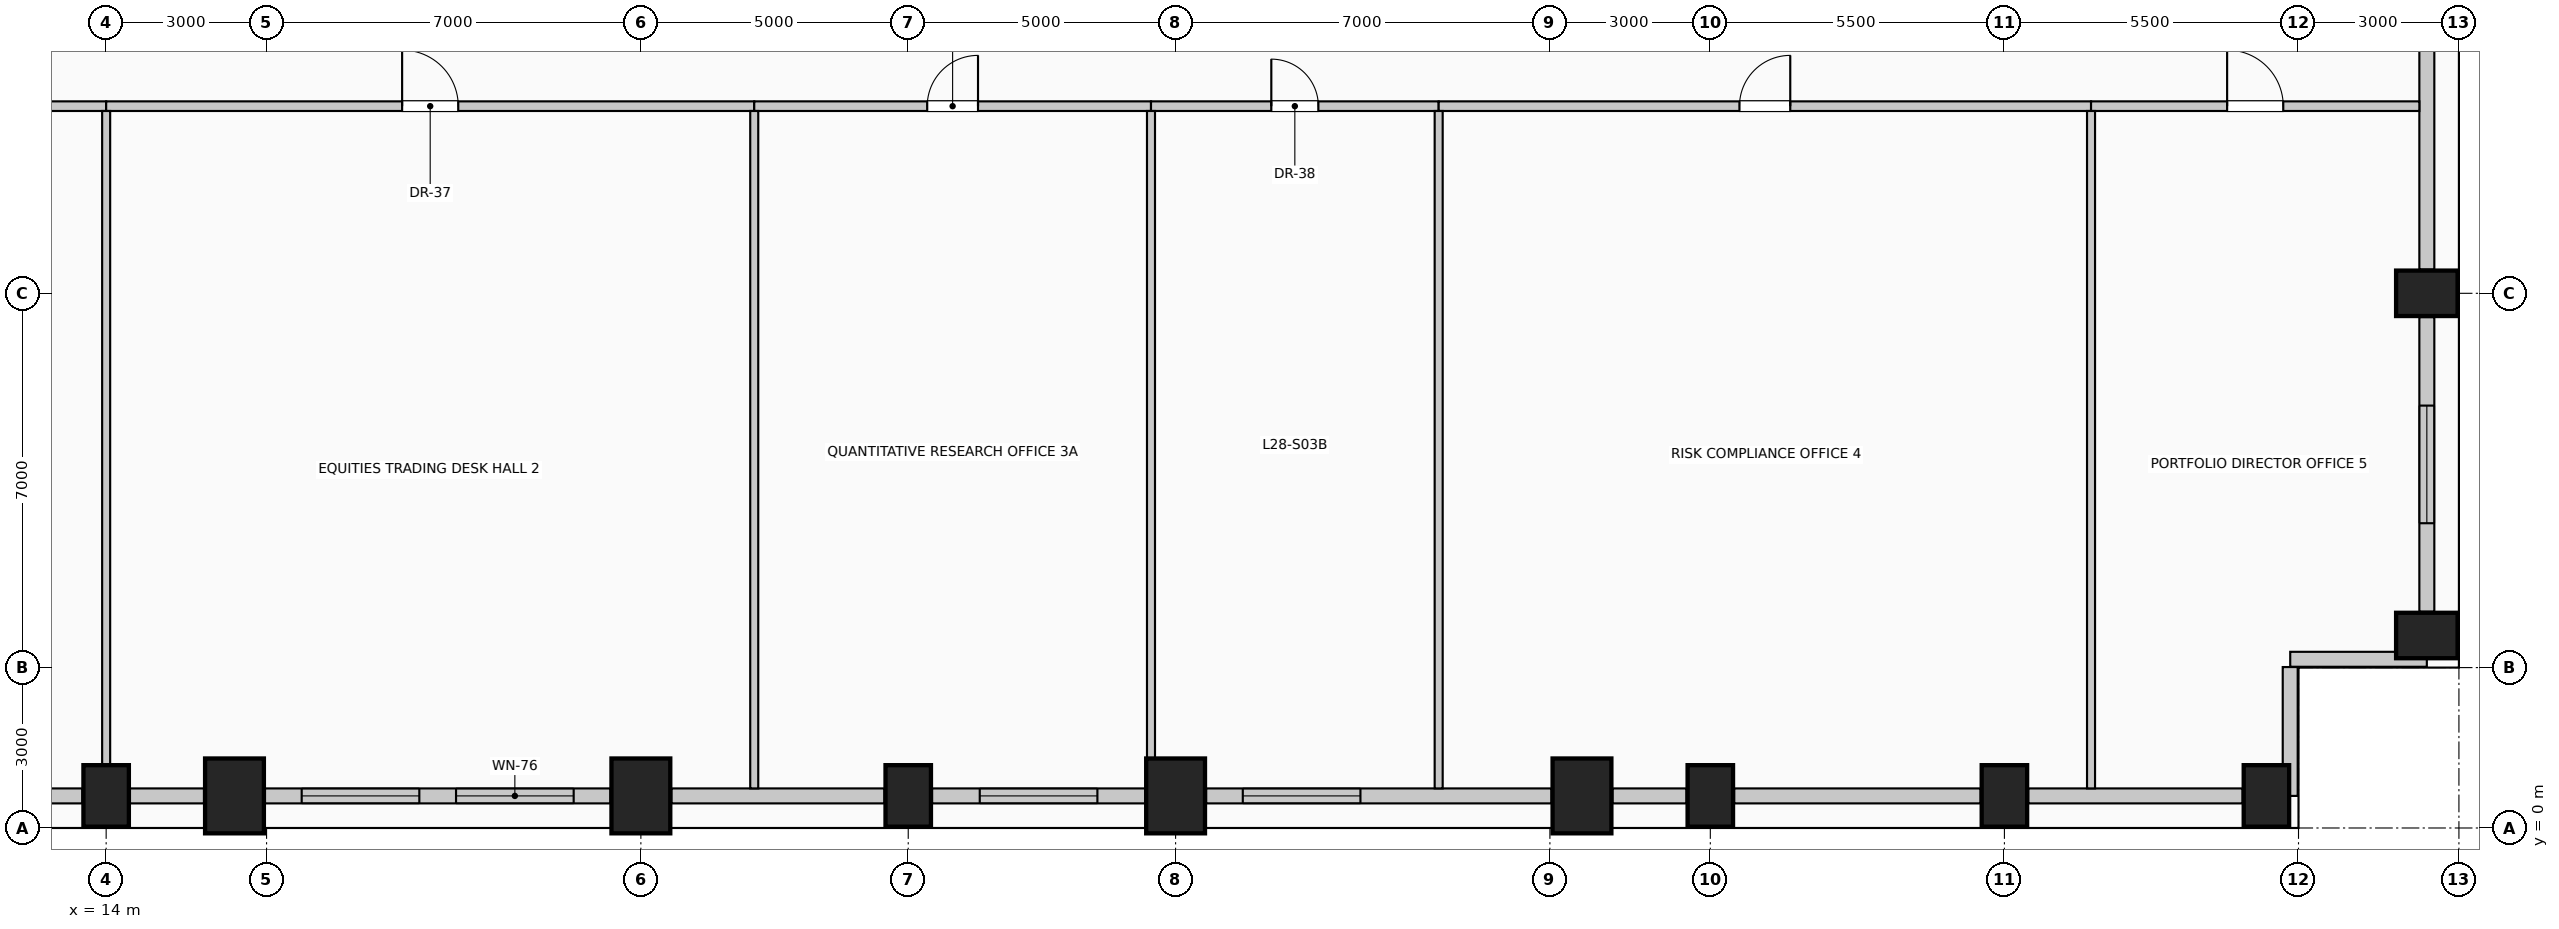
"""IFC4 building model, lengths in metres.
Left out: names, types, materials, properties, quantities, classifications, styles, units other than length and angle.
Written with IfcOpenShell. Run it as: python <this file> out.ifc"""

import sys

from ifc_helpers import new_model, si_unit, direction, frame, frame_2d, origin, origin_2d, place, context, subcontext, project, spatial, rectangle, extrude, element, fill, save


model = new_model("IFC4")
c1 = context("Model", 3, precision=1e-05, world=origin(), true_north=direction((0.0, 1.0)))
c2 = subcontext(c1, "Body", "Model", "MODEL_VIEW")
j1 = project(units=[si_unit("LENGTHUNIT", "METRE"), si_unit("PLANEANGLEUNIT", "RADIAN")], contexts=[c1])
p1 = place(None, origin())
s1 = spatial("IfcSite", under=j1, at=p1, CompositionType="ELEMENT")
p2 = place(p1, origin())
s2 = spatial("IfcBuilding", under=s1, at=p2, CompositionType="ELEMENT")
p3 = place(p2, frame((0.0, 0.0, 116.6)))
s3 = spatial("IfcBuildingStorey", under=s2, at=p3, CompositionType="ELEMENT", Elevation=116.6)
p4 = place(p3, frame((14.0, 0.6, 0.0), z_axis=(0.0, 0.0, 1.0), x_axis=(1.0, 0.0, 0.0)))
e1 = element("IfcColumn", 1, at=p4, inside=s3, PredefinedType="COLUMN", context=c2, shape_type="SweptSolid", body=[
    extrude(rectangle(XDim=0.85, YDim=1.15, at=origin_2d()), origin(), (0.0, 0.0, 1.0), 4.0),
])
for number, where, z_axis, x_axis in (
    (2, (16.4, 0.6, 0.0), (0.0, 0.0, 1.0), (1.0, 0.0, 0.0)),
    (3, (24.0, 0.6, 0.0), (0.0, 0.0, 1.0), (1.0, 0.0, 0.0)),
):
    element("IfcColumn", number, at=place(p3, frame(where, z_axis=z_axis, x_axis=x_axis)), inside=s3, PredefinedType="COLUMN", context=c2, shape_type="SweptSolid", body=[
        extrude(rectangle(XDim=1.1, YDim=1.4, at=origin_2d()), origin(), (0.0, 0.0, 1.0), 4.0),
    ])
p5 = place(p3, frame((29.0, 0.6, 0.0), z_axis=(0.0, 0.0, 1.0), x_axis=(1.0, 0.0, 0.0)))
e4 = element("IfcColumn", 4, at=p5, inside=s3, PredefinedType="COLUMN", context=c2, shape_type="SweptSolid", body=[
    extrude(rectangle(XDim=0.85, YDim=1.15, at=origin_2d()), origin(), (0.0, 0.0, 1.0), 4.0),
])
for number, where, z_axis, x_axis in (
    (5, (34.0, 0.6, 0.0), (0.0, 0.0, 1.0), (1.0, 0.0, 0.0)),
    (6, (41.6, 0.6, 0.0), (0.0, 0.0, 1.0), (1.0, 0.0, 0.0)),
):
    element("IfcColumn", number, at=place(p3, frame(where, z_axis=z_axis, x_axis=x_axis)), inside=s3, PredefinedType="COLUMN", context=c2, shape_type="SweptSolid", body=[
        extrude(rectangle(XDim=1.1, YDim=1.4, at=origin_2d()), origin(), (0.0, 0.0, 1.0), 4.0),
    ])
for number, where, z_axis, x_axis in (
    (7, (44.0, 0.6, 0.0), (0.0, 0.0, 1.0), (1.0, 0.0, 0.0)),
    (8, (49.5, 0.6, 0.0), (0.0, 0.0, 1.0), (1.0, 0.0, 0.0)),
    (9, (54.4, 0.6, 0.0), (0.0, 0.0, 1.0), (1.0, 0.0, 0.0)),
    (10, (57.4, 3.6, 0.0), (0.0, 0.0, 1.0), (0.0, 1.0, 0.0)),
    (11, (57.4, 10.0, 0.0), (0.0, 0.0, 1.0), (0.0, 1.0, 0.0)),
):
    element("IfcColumn", number, at=place(p3, frame(where, z_axis=z_axis, x_axis=x_axis)), inside=s3, PredefinedType="COLUMN", context=c2, shape_type="SweptSolid", body=[
        extrude(rectangle(XDim=0.85, YDim=1.15, at=origin_2d()), origin(), (0.0, 0.0, 1.0), 4.0),
    ])
p6 = place(p3, frame((13.555, 0.6, 0.0), z_axis=(0.0, 0.0, 1.0), x_axis=(-1.0, 0.0, 0.0)))
e12 = element("IfcWall", 12, at=p6, inside=s3, PredefinedType="SOLIDWALL", context=c2, shape_type="SweptSolid", body=[
    extrude(rectangle(XDim=4.61, YDim=0.28, at=frame_2d((2.305, 0.0))), origin(), (0.0, 0.0, 1.0), 2.875),
])
p7 = place(p3, frame((15.83, 0.6, 0.0), z_axis=(0.0, 0.0, 1.0), x_axis=(-1.0, 0.0, 0.0)))
e13 = element("IfcWall", 13, at=p7, inside=s3, PredefinedType="SOLIDWALL", context=c2, shape_type="SweptSolid", body=[
    extrude(rectangle(XDim=1.385, YDim=0.28, at=frame_2d((0.692, 0.0))), origin(), (0.0, 0.0, 1.0), 2.875),
])
p8 = place(p3, frame((23.43, 0.6, 0.0), z_axis=(0.0, 0.0, 1.0), x_axis=(-1.0, 0.0, 0.0)))
e14 = element("IfcWall", 14, at=p8, inside=s3, PredefinedType="SOLIDWALL", context=c2, shape_type="SweptSolid", body=[
    extrude(rectangle(XDim=6.46, YDim=0.28, at=frame_2d((3.23, 0.0))), origin(), (0.0, 0.0, 1.0), 2.875),
])
p9 = place(p8, frame((0.687, 0.0, 0.5)))
e15 = element("IfcOpeningElement", 15, at=p9, cuts=e14, PredefinedType="OPENING", context=c2, shape_type="SweptSolid", body=[
    extrude(rectangle(XDim=2.2, YDim=1.95, at=frame_2d((1.1, 0.975))), frame((0.0, 0.15, 0.0), z_axis=(0.0, -1.0, 0.0), x_axis=(1.0, 0.0, 0.0)), (0.0, 0.0, 1.0), 0.3),
])
p10 = place(p8, frame((3.573, 0.0, 0.5)))
e16 = element("IfcOpeningElement", 16, at=p10, cuts=e14, PredefinedType="OPENING", context=c2, shape_type="SweptSolid", body=[
    extrude(rectangle(XDim=2.2, YDim=1.95, at=frame_2d((1.1, 0.975))), frame((0.0, 0.15, 0.0), z_axis=(0.0, -1.0, 0.0), x_axis=(1.0, 0.0, 0.0)), (0.0, 0.0, 1.0), 0.3),
])
p11 = place(p3, frame((28.555, 0.6, 0.0), z_axis=(0.0, 0.0, 1.0), x_axis=(-1.0, 0.0, 0.0)))
e17 = element("IfcWall", 17, at=p11, inside=s3, PredefinedType="SOLIDWALL", context=c2, shape_type="SweptSolid", body=[
    extrude(rectangle(XDim=3.985, YDim=0.28, at=frame_2d((1.992, 0.0))), origin(), (0.0, 0.0, 1.0), 2.875),
])
p12 = place(p3, frame((33.43, 0.6, 0.0), z_axis=(0.0, 0.0, 1.0), x_axis=(-1.0, 0.0, 0.0)))
e18 = element("IfcWall", 18, at=p12, inside=s3, PredefinedType="SOLIDWALL", context=c2, shape_type="SweptSolid", body=[
    extrude(rectangle(XDim=3.985, YDim=0.28, at=frame_2d((1.992, 0.0))), origin(), (0.0, 0.0, 1.0), 2.875),
])
p13 = place(p12, frame((0.893, 0.0, 0.5)))
e19 = element("IfcOpeningElement", 19, at=p13, cuts=e18, PredefinedType="OPENING", context=c2, shape_type="SweptSolid", body=[
    extrude(rectangle(XDim=2.2, YDim=1.95, at=frame_2d((1.1, 0.975))), frame((0.0, 0.15, 0.0), z_axis=(0.0, -1.0, 0.0), x_axis=(1.0, 0.0, 0.0)), (0.0, 0.0, 1.0), 0.3),
])
p14 = place(p3, frame((41.03, 0.6, 0.0), z_axis=(0.0, 0.0, 1.0), x_axis=(-1.0, 0.0, 0.0)))
e20 = element("IfcWall", 20, at=p14, inside=s3, PredefinedType="SOLIDWALL", context=c2, shape_type="SweptSolid", body=[
    extrude(rectangle(XDim=6.46, YDim=0.28, at=frame_2d((3.23, 0.0))), origin(), (0.0, 0.0, 1.0), 2.875),
])
p15 = place(p14, frame((3.573, 0.0, 0.5)))
e21 = element("IfcOpeningElement", 21, at=p15, cuts=e20, PredefinedType="OPENING", context=c2, shape_type="SweptSolid", body=[
    extrude(rectangle(XDim=2.2, YDim=1.95, at=frame_2d((1.1, 0.975))), frame((0.0, 0.15, 0.0), z_axis=(0.0, -1.0, 0.0), x_axis=(1.0, 0.0, 0.0)), (0.0, 0.0, 1.0), 0.3),
])
p16 = place(p3, frame((43.555, 0.6, 0.0), z_axis=(0.0, 0.0, 1.0), x_axis=(-1.0, 0.0, 0.0)))
e22 = element("IfcWall", 22, at=p16, inside=s3, PredefinedType="SOLIDWALL", context=c2, shape_type="SweptSolid", body=[
    extrude(rectangle(XDim=1.385, YDim=0.28, at=frame_2d((0.692, 0.0))), origin(), (0.0, 0.0, 1.0), 2.875),
])
p17 = place(p3, frame((49.055, 0.6, 0.0), z_axis=(0.0, 0.0, 1.0), x_axis=(-1.0, 0.0, 0.0)))
e23 = element("IfcWall", 23, at=p17, inside=s3, PredefinedType="SOLIDWALL", context=c2, shape_type="SweptSolid", body=[
    extrude(rectangle(XDim=4.61, YDim=0.28, at=frame_2d((2.305, 0.0))), origin(), (0.0, 0.0, 1.0), 2.875),
])
p18 = place(p3, frame((53.955, 0.6, 0.0), z_axis=(0.0, 0.0, 1.0), x_axis=(-1.0, 0.0, 0.0)))
e24 = element("IfcWall", 24, at=p18, inside=s3, PredefinedType="SOLIDWALL", context=c2, shape_type="SweptSolid", body=[
    extrude(rectangle(XDim=4.01, YDim=0.28, at=frame_2d((2.005, 0.0))), origin(), (0.0, 0.0, 1.0), 2.875),
])
p19 = place(p3, frame((57.4, 9.555, 0.0), z_axis=(0.0, 0.0, 1.0), x_axis=(0.0, -1.0, 0.0)))
e25 = element("IfcWall", 25, at=p19, inside=s3, PredefinedType="SOLIDWALL", context=c2, shape_type="SweptSolid", body=[
    extrude(rectangle(XDim=5.51, YDim=0.28, at=frame_2d((2.755, 0.0))), origin(), (0.0, 0.0, 1.0), 2.875),
])
p20 = place(p19, frame((1.655, 0.0, 0.5)))
e26 = element("IfcOpeningElement", 26, at=p20, cuts=e25, PredefinedType="OPENING", context=c2, shape_type="SweptSolid", body=[
    extrude(rectangle(XDim=2.2, YDim=1.95, at=frame_2d((1.1, 0.975))), frame((0.0, 0.15, 0.0), z_axis=(0.0, -1.0, 0.0), x_axis=(1.0, 0.0, 0.0)), (0.0, 0.0, 1.0), 0.3),
])
p21 = place(p3, frame((57.4, 17.555, 0.0), z_axis=(0.0, 0.0, 1.0), x_axis=(0.0, -1.0, 0.0)))
e27 = element("IfcWall", 27, at=p21, inside=s3, PredefinedType="SOLIDWALL", context=c2, shape_type="SweptSolid", body=[
    extrude(rectangle(XDim=7.11, YDim=0.28, at=frame_2d((3.555, 0.0))), origin(), (0.0, 0.0, 1.0), 2.875),
])
p22 = place(p3, frame((57.4, 3.155, 0.0), z_axis=(0.0, 0.0, 1.0), x_axis=(-1.0, 0.0, 0.0)))
e28 = element("IfcWall", 28, at=p22, inside=s3, PredefinedType="SOLIDWALL", context=c2, shape_type="SweptSolid", body=[
    extrude(rectangle(XDim=2.555, YDim=0.28, at=frame_2d((1.277, 0.0))), origin(), (0.0, 0.0, 1.0), 3.725),
])
p23 = place(p3, frame((54.845, 3.01, 0.0), z_axis=(0.0, 0.0, 1.0), x_axis=(0.0, -1.0, 0.0)))
e29 = element("IfcWall", 29, at=p23, inside=s3, PredefinedType="SOLIDWALL", context=c2, shape_type="SweptSolid", body=[
    extrude(rectangle(XDim=2.41, YDim=0.28, at=frame_2d((1.205, 0.0))), origin(), (0.0, 0.0, 1.0), 3.725),
])
p24 = place(p3, frame((0.74, 13.5, 0.0), z_axis=(0.0, 0.0, 1.0), x_axis=(1.0, 0.0, 0.0)))
e30 = element("IfcWall", 30, at=p24, inside=s3, PredefinedType="PARTITIONING", context=c2, shape_type="SweptSolid", body=[
    extrude(rectangle(XDim=13.26, YDim=0.18, at=frame_2d((6.63, 0.0))), origin(), (0.0, 0.0, 1.0), 3.725),
])
p25 = place(p24, frame((6.155, 0.0, 0.0)))
e31 = element("IfcOpeningElement", 31, at=p25, cuts=e30, PredefinedType="OPENING", context=c2, shape_type="SweptSolid", body=[
    extrude(rectangle(XDim=0.95, YDim=2.15, at=frame_2d((0.475, 1.075))), frame((0.0, 0.1, 0.0), z_axis=(0.0, -1.0, 0.0), x_axis=(1.0, 0.0, 0.0)), (0.0, 0.0, 1.0), 0.2),
])
p26 = place(p3, frame((14.0, 13.5, 0.0), z_axis=(0.0, 0.0, 1.0), x_axis=(1.0, 0.0, 0.0)))
e32 = element("IfcWall", 32, at=p26, inside=s3, PredefinedType="PARTITIONING", context=c2, shape_type="SweptSolid", body=[
    extrude(rectangle(XDim=12.12, YDim=0.18, at=frame_2d((6.06, 0.0))), origin(), (0.0, 0.0, 1.0), 3.725),
])
p27 = place(p26, frame((5.535, 0.0, 0.0)))
e33 = element("IfcOpeningElement", 33, at=p27, cuts=e32, PredefinedType="OPENING", context=c2, shape_type="SweptSolid", body=[
    extrude(rectangle(XDim=1.05, YDim=2.15, at=frame_2d((0.525, 1.075))), frame((0.0, 0.1, 0.0), z_axis=(0.0, -1.0, 0.0), x_axis=(1.0, 0.0, 0.0)), (0.0, 0.0, 1.0), 0.2),
])
p28 = place(p3, frame((26.12, 13.5, 0.0), z_axis=(0.0, 0.0, 1.0), x_axis=(1.0, 0.0, 0.0)))
e34 = element("IfcWall", 34, at=p28, inside=s3, PredefinedType="PARTITIONING", context=c2, shape_type="SweptSolid", body=[
    extrude(rectangle(XDim=7.42, YDim=0.18, at=frame_2d((3.71, 0.0))), origin(), (0.0, 0.0, 1.0), 3.725),
])
p29 = place(p28, frame((3.235, 0.0, 0.0)))
e35 = element("IfcOpeningElement", 35, at=p29, cuts=e34, PredefinedType="OPENING", context=c2, shape_type="SweptSolid", body=[
    extrude(rectangle(XDim=0.95, YDim=2.15, at=frame_2d((0.475, 1.075))), frame((0.0, 0.1, 0.0), z_axis=(0.0, -1.0, 0.0), x_axis=(1.0, 0.0, 0.0)), (0.0, 0.0, 1.0), 0.2),
])
p30 = place(p3, frame((33.54, 13.5, 0.0), z_axis=(0.0, 0.0, 1.0), x_axis=(1.0, 0.0, 0.0)))
e36 = element("IfcWall", 36, at=p30, inside=s3, PredefinedType="PARTITIONING", context=c2, shape_type="SweptSolid", body=[
    extrude(rectangle(XDim=5.38, YDim=0.18, at=frame_2d((2.69, 0.0))), origin(), (0.0, 0.0, 1.0), 3.725),
])
p31 = place(p30, frame((2.25, 0.0, 0.0)))
e37 = element("IfcOpeningElement", 37, at=p31, cuts=e36, PredefinedType="OPENING", context=c2, shape_type="SweptSolid", body=[
    extrude(rectangle(XDim=0.88, YDim=2.1, at=frame_2d((0.44, 1.05))), frame((0.0, 0.1, 0.0), z_axis=(0.0, -1.0, 0.0), x_axis=(1.0, 0.0, 0.0)), (0.0, 0.0, 1.0), 0.2),
])
p32 = place(p3, frame((38.92, 13.5, 0.0), z_axis=(0.0, 0.0, 1.0), x_axis=(1.0, 0.0, 0.0)))
e38 = element("IfcWall", 38, at=p32, inside=s3, PredefinedType="PARTITIONING", context=c2, shape_type="SweptSolid", body=[
    extrude(rectangle(XDim=12.2, YDim=0.18, at=frame_2d((6.1, 0.0))), origin(), (0.0, 0.0, 1.0), 3.725),
])
p33 = place(p32, frame((5.625, 0.0, 0.0)))
e39 = element("IfcOpeningElement", 39, at=p33, cuts=e38, PredefinedType="OPENING", context=c2, shape_type="SweptSolid", body=[
    extrude(rectangle(XDim=0.95, YDim=2.15, at=frame_2d((0.475, 1.075))), frame((0.0, 0.1, 0.0), z_axis=(0.0, -1.0, 0.0), x_axis=(1.0, 0.0, 0.0)), (0.0, 0.0, 1.0), 0.2),
])
p34 = place(p3, frame((51.12, 13.5, 0.0), z_axis=(0.0, 0.0, 1.0), x_axis=(1.0, 0.0, 0.0)))
e40 = element("IfcWall", 40, at=p34, inside=s3, PredefinedType="PARTITIONING", context=c2, shape_type="SweptSolid", body=[
    extrude(rectangle(XDim=6.14, YDim=0.18, at=frame_2d((3.07, 0.0))), origin(), (0.0, 0.0, 1.0), 3.725),
])
p35 = place(p34, frame((2.545, 0.0, 0.0)))
e41 = element("IfcOpeningElement", 41, at=p35, cuts=e40, PredefinedType="OPENING", context=c2, shape_type="SweptSolid", body=[
    extrude(rectangle(XDim=1.05, YDim=2.15, at=frame_2d((0.525, 1.075))), frame((0.0, 0.1, 0.0), z_axis=(0.0, -1.0, 0.0), x_axis=(1.0, 0.0, 0.0)), (0.0, 0.0, 1.0), 0.2),
])
p36 = place(p3, frame((14.0, 1.175, 0.0), z_axis=(0.0, 0.0, 1.0), x_axis=(0.0, 1.0, 0.0)))
e42 = element("IfcWall", 42, at=p36, inside=s3, PredefinedType="PARTITIONING", context=c2, shape_type="SweptSolid", body=[
    extrude(rectangle(XDim=12.235, YDim=0.15, at=frame_2d((6.117, 0.0))), origin(), (0.0, 0.0, 1.0), 3.725),
])
p37 = place(p3, frame((26.12, 0.74, 0.0), z_axis=(0.0, 0.0, 1.0), x_axis=(0.0, 1.0, 0.0)))
e43 = element("IfcWall", 43, at=p37, inside=s3, PredefinedType="PARTITIONING", context=c2, shape_type="SweptSolid", body=[
    extrude(rectangle(XDim=12.67, YDim=0.15, at=frame_2d((6.335, 0.0))), origin(), (0.0, 0.0, 1.0), 3.725),
])
p38 = place(p3, frame((33.54, 1.3, 0.0), z_axis=(0.0, 0.0, 1.0), x_axis=(0.0, 1.0, 0.0)))
e44 = element("IfcWall", 44, at=p38, inside=s3, PredefinedType="PARTITIONING", context=c2, shape_type="SweptSolid", body=[
    extrude(rectangle(XDim=12.11, YDim=0.15, at=frame_2d((6.055, 0.0))), origin(), (0.0, 0.0, 1.0), 3.725),
])
for number, where, z_axis, x_axis in (
    (45, (38.92, 0.74, 0.0), (0.0, 0.0, 1.0), (0.0, 1.0, 0.0)),
    (46, (51.12, 0.74, 0.0), (0.0, 0.0, 1.0), (0.0, 1.0, 0.0)),
):
    element("IfcWall", number, at=place(p3, frame(where, z_axis=z_axis, x_axis=x_axis)), inside=s3, PredefinedType="PARTITIONING", context=c2, shape_type="SweptSolid", body=[
        extrude(rectangle(XDim=12.67, YDim=0.15, at=frame_2d((6.335, 0.0))), origin(), (0.0, 0.0, 1.0), 3.725),
    ])
p39 = place(p9, origin())
e47 = element("IfcWindow", 47, at=p39, inside=s3, PartitioningType="SINGLE_PANEL", PredefinedType="WINDOW", context=c2, shape_type="SweptSolid", body=[
    extrude(rectangle(XDim=2.2, YDim=1.95, at=frame_2d((1.1, 0.975))), frame((0.0, 0.03, 0.0), z_axis=(0.0, -1.0, 0.0), x_axis=(1.0, 0.0, 0.0)), (0.0, 0.0, 1.0), 0.06),
])
fill(e15, e47)
p40 = place(p10, origin())
e48 = element("IfcWindow", 48, at=p40, inside=s3, PartitioningType="SINGLE_PANEL", PredefinedType="WINDOW", context=c2, shape_type="SweptSolid", body=[
    extrude(rectangle(XDim=2.2, YDim=1.95, at=frame_2d((1.1, 0.975))), frame((0.0, 0.03, 0.0), z_axis=(0.0, -1.0, 0.0), x_axis=(1.0, 0.0, 0.0)), (0.0, 0.0, 1.0), 0.06),
])
fill(e16, e48)
p41 = place(p13, origin())
e49 = element("IfcWindow", 49, at=p41, inside=s3, PartitioningType="SINGLE_PANEL", PredefinedType="WINDOW", context=c2, shape_type="SweptSolid", body=[
    extrude(rectangle(XDim=2.2, YDim=1.95, at=frame_2d((1.1, 0.975))), frame((0.0, 0.03, 0.0), z_axis=(0.0, -1.0, 0.0), x_axis=(1.0, 0.0, 0.0)), (0.0, 0.0, 1.0), 0.06),
])
fill(e19, e49)
p42 = place(p15, origin())
e50 = element("IfcWindow", 50, at=p42, inside=s3, PartitioningType="SINGLE_PANEL", PredefinedType="WINDOW", context=c2, shape_type="SweptSolid", body=[
    extrude(rectangle(XDim=2.2, YDim=1.95, at=frame_2d((1.1, 0.975))), frame((0.0, 0.03, 0.0), z_axis=(0.0, -1.0, 0.0), x_axis=(1.0, 0.0, 0.0)), (0.0, 0.0, 1.0), 0.06),
])
fill(e21, e50)
p43 = place(p20, origin())
e51 = element("IfcWindow", 51, at=p43, inside=s3, PartitioningType="SINGLE_PANEL", PredefinedType="WINDOW", context=c2, shape_type="SweptSolid", body=[
    extrude(rectangle(XDim=2.2, YDim=1.95, at=frame_2d((1.1, 0.975))), frame((0.0, 0.03, 0.0), z_axis=(0.0, -1.0, 0.0), x_axis=(1.0, 0.0, 0.0)), (0.0, 0.0, 1.0), 0.06),
])
fill(e26, e51)
p44 = place(p27, origin())
e52 = element("IfcDoor", 52, at=p44, inside=s3, OperationType="SINGLE_SWING_LEFT", PredefinedType="DOOR", context=c2, shape_type="SweptSolid", body=[
    extrude(rectangle(XDim=1.05, YDim=2.15, at=frame_2d((0.525, 1.075))), frame((0.0, 0.025, 0.0), z_axis=(0.0, -1.0, 0.0), x_axis=(1.0, 0.0, 0.0)), (0.0, 0.0, 1.0), 0.05),
])
fill(e33, e52)
p45 = place(p29, origin())
e53 = element("IfcDoor", 53, at=p45, inside=s3, OperationType="SINGLE_SWING_RIGHT", PredefinedType="DOOR", context=c2, shape_type="SweptSolid", body=[
    extrude(rectangle(XDim=0.95, YDim=2.15, at=frame_2d((0.475, 1.075))), frame((0.0, 0.025, 0.0), z_axis=(0.0, -1.0, 0.0), x_axis=(1.0, 0.0, 0.0)), (0.0, 0.0, 1.0), 0.05),
])
fill(e35, e53)
p46 = place(p31, origin())
e54 = element("IfcDoor", 54, at=p46, inside=s3, OperationType="SINGLE_SWING_LEFT", PredefinedType="DOOR", context=c2, shape_type="SweptSolid", body=[
    extrude(rectangle(XDim=0.88, YDim=2.1, at=frame_2d((0.44, 1.05))), frame((0.0, 0.025, 0.0), z_axis=(0.0, -1.0, 0.0), x_axis=(1.0, 0.0, 0.0)), (0.0, 0.0, 1.0), 0.05),
])
fill(e37, e54)
p47 = place(p33, origin())
e55 = element("IfcDoor", 55, at=p47, inside=s3, OperationType="SINGLE_SWING_RIGHT", PredefinedType="DOOR", context=c2, shape_type="SweptSolid", body=[
    extrude(rectangle(XDim=0.95, YDim=2.15, at=frame_2d((0.475, 1.075))), frame((0.0, 0.025, 0.0), z_axis=(0.0, -1.0, 0.0), x_axis=(1.0, 0.0, 0.0)), (0.0, 0.0, 1.0), 0.05),
])
fill(e39, e55)
p48 = place(p35, origin())
e56 = element("IfcDoor", 56, at=p48, inside=s3, OperationType="SINGLE_SWING_LEFT", PredefinedType="DOOR", context=c2, shape_type="SweptSolid", body=[
    extrude(rectangle(XDim=1.05, YDim=2.15, at=frame_2d((0.525, 1.075))), frame((0.0, 0.025, 0.0), z_axis=(0.0, -1.0, 0.0), x_axis=(1.0, 0.0, 0.0)), (0.0, 0.0, 1.0), 0.05),
])
fill(e41, e56)
save(model, sys.argv[1])
